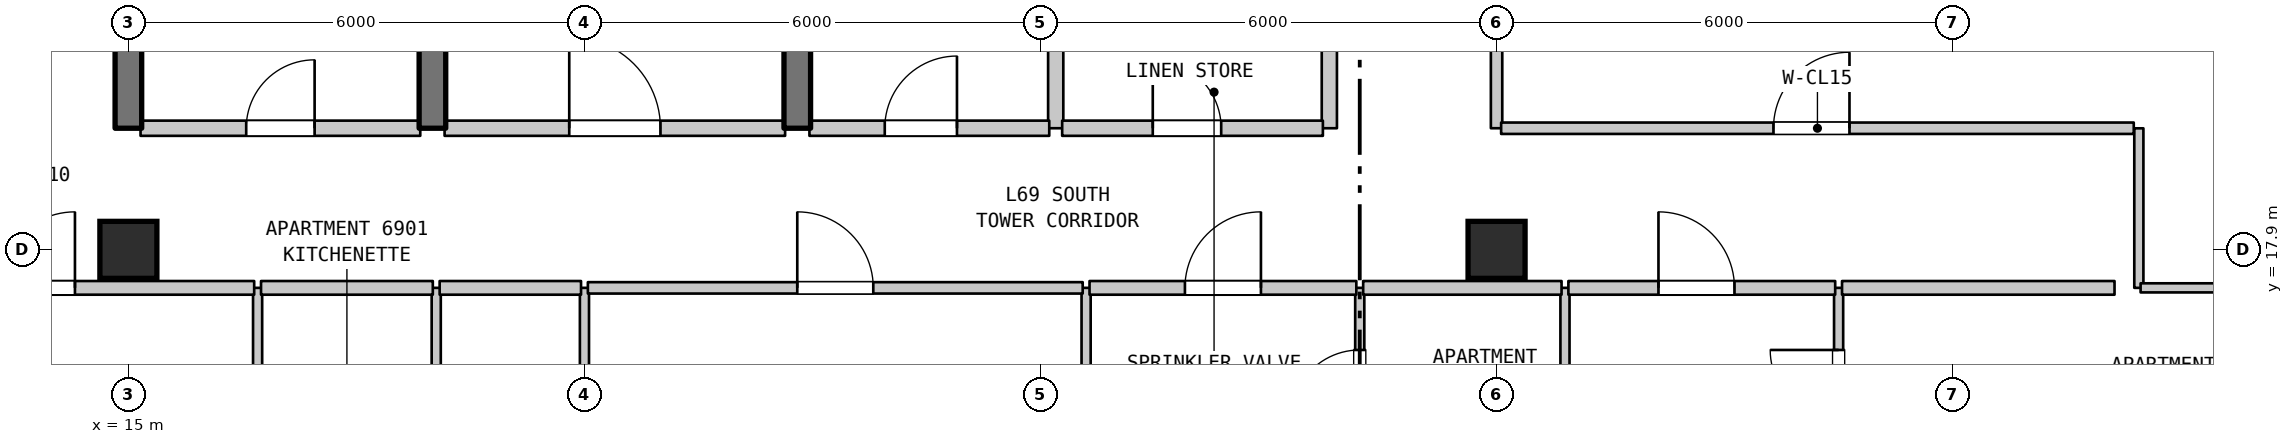
"""IFC4 building model, lengths in metres.
Left out: names, types, materials, properties, quantities, classifications, styles, units other than length and angle.
Written with IfcOpenShell. Run it as: python <this file> out.ifc"""

import sys

from ifc_helpers import new_model, si_unit, direction, frame, frame_2d, origin, origin_2d, place, context, subcontext, project, spatial, rectangle, extrude, element, fill, save


model = new_model("IFC4")
c1 = context("Model", 3, precision=1e-05, world=origin(), true_north=direction((0.0, 1.0)))
c2 = subcontext(c1, "Body", "Model", "MODEL_VIEW")
j1 = project(units=[si_unit("LENGTHUNIT", "METRE"), si_unit("PLANEANGLEUNIT", "RADIAN")], contexts=[c1])
p1 = place(None, origin())
s1 = spatial("IfcSite", under=j1, at=p1, CompositionType="ELEMENT")
p2 = place(p1, origin())
s2 = spatial("IfcBuilding", under=s1, at=p2, CompositionType="ELEMENT")
p3 = place(p2, frame((0.0, 0.0, 276.9)))
s3 = spatial("IfcBuildingStorey", under=s2, at=p3, CompositionType="ELEMENT", Elevation=276.9)
for number, where, z_axis, x_axis in (
    (1, (15.0, 17.9, 0.0), (0.0, 0.0, 1.0), (1.0, 0.0, 0.0)),
    (2, (33.0, 17.9, 0.0), (0.0, 0.0, 1.0), (1.0, 0.0, 0.0)),
):
    element("IfcColumn", number, at=place(p3, frame(where, z_axis=z_axis, x_axis=x_axis)), inside=s3, PredefinedType="COLUMN", context=c2, shape_type="SweptSolid", body=[
        extrude(rectangle(XDim=0.75, YDim=0.75, at=origin_2d()), origin(), (0.0, 0.0, 1.0), 3.7),
    ])
p4 = place(p3, frame((15.0, 19.5, 0.0), z_axis=(0.0, 0.0, 1.0), x_axis=(0.0, 1.0, 0.0)))
e3 = element("IfcWall", 3, at=p4, inside=s3, PredefinedType="SHEAR", context=c2, shape_type="SweptSolid", body=[
    extrude(rectangle(XDim=3.2, YDim=0.35, at=frame_2d((1.6, 0.0))), origin(), (0.0, 0.0, 1.0), 3.39),
])
p5 = place(p3, frame((16.7, 14.2, 0.0), z_axis=(0.0, 0.0, 1.0), x_axis=(0.0, 1.0, 0.0)))
e4 = element("IfcWall", 4, at=p5, inside=s3, PredefinedType="PARTITIONING", context=c2, shape_type="SweptSolid", body=[
    extrude(rectangle(XDim=3.2, YDim=0.12, at=frame_2d((1.6, 0.0))), origin(), (0.0, 0.0, 1.0), 3.39),
])
p6 = place(p5, frame((1.15, 0.0, 0.0)))
e5 = element("IfcOpeningElement", 5, at=p6, cuts=e4, PredefinedType="OPENING", context=c2, shape_type="SweptSolid", body=[
    extrude(rectangle(XDim=0.9, YDim=2.15, at=frame_2d((0.45, 1.075))), frame((0.0, 0.07, 0.0), z_axis=(0.0, -1.0, 0.0), x_axis=(1.0, 0.0, 0.0)), (0.0, 0.0, 1.0), 0.14),
])
p7 = place(p3, frame((19.0, 19.5, 0.0), z_axis=(0.0, 0.0, 1.0), x_axis=(0.0, 1.0, 0.0)))
e6 = element("IfcWall", 6, at=p7, inside=s3, PredefinedType="SHEAR", context=c2, shape_type="SweptSolid", body=[
    extrude(rectangle(XDim=3.2, YDim=0.35, at=frame_2d((1.6, 0.0))), origin(), (0.0, 0.0, 1.0), 3.39),
])
p8 = place(p3, frame((19.05, 14.2, 0.0), z_axis=(0.0, 0.0, 1.0), x_axis=(0.0, 1.0, 0.0)))
e7 = element("IfcWall", 7, at=p8, inside=s3, PredefinedType="PARTITIONING", context=c2, shape_type="SweptSolid", body=[
    extrude(rectangle(XDim=3.2, YDim=0.12, at=frame_2d((1.6, 0.0))), origin(), (0.0, 0.0, 1.0), 3.39),
])
p9 = place(p3, frame((21.0, 6.999, 0.0), z_axis=(0.0, 0.0, 1.0), x_axis=(0.0, 1.0, 0.0)))
e8 = element("IfcWall", 8, at=p9, inside=s3, PredefinedType="PARTITIONING", context=c2, shape_type="SweptSolid", body=[
    extrude(rectangle(XDim=10.401, YDim=0.12, at=frame_2d((5.2, 0.0))), origin(), (0.0, 0.0, 1.0), 3.39),
])
p10 = place(p3, frame((23.8, 19.5, 0.0), z_axis=(0.0, 0.0, 1.0), x_axis=(0.0, 1.0, 0.0)))
e9 = element("IfcWall", 9, at=p10, inside=s3, PredefinedType="SHEAR", context=c2, shape_type="SweptSolid", body=[
    extrude(rectangle(XDim=3.2, YDim=0.35, at=frame_2d((1.6, 0.0))), origin(), (0.0, 0.0, 1.0), 3.39),
])
p11 = place(p3, frame((27.2, 19.5, 0.0), z_axis=(0.0, 0.0, 1.0), x_axis=(0.0, 1.0, 0.0)))
e10 = element("IfcWall", 10, at=p11, inside=s3, PredefinedType="STANDARD", context=c2, shape_type="SweptSolid", body=[
    extrude(rectangle(XDim=1.6, YDim=0.2, at=frame_2d((0.8, 0.0))), origin(), (0.0, 0.0, 1.0), 3.39),
])
p12 = place(p3, frame((27.6, 6.71, 0.0), z_axis=(0.0, 0.0, 1.0), x_axis=(0.0, 1.0, 0.0)))
e11 = element("IfcWall", 11, at=p12, inside=s3, PredefinedType="PARTITIONING", context=c2, shape_type="SweptSolid", body=[
    extrude(rectangle(XDim=10.69, YDim=0.12, at=frame_2d((5.345, 0.0))), origin(), (0.0, 0.0, 1.0), 3.39),
])
p13 = place(p3, frame((30.8, 19.5, 0.0), z_axis=(0.0, 0.0, 1.0), x_axis=(0.0, 1.0, 0.0)))
e12 = element("IfcWall", 12, at=p13, inside=s3, PredefinedType="STANDARD", context=c2, shape_type="SweptSolid", body=[
    extrude(rectangle(XDim=1.6, YDim=0.2, at=frame_2d((0.8, 0.0))), origin(), (0.0, 0.0, 1.0), 3.39),
])
p14 = place(p3, frame((31.2, 15.008, 0.0), z_axis=(0.0, 0.0, 1.0), x_axis=(0.0, 1.0, 0.0)))
e13 = element("IfcWall", 13, at=p14, inside=s3, PredefinedType="PARTITIONING", context=c2, shape_type="SweptSolid", body=[
    extrude(rectangle(XDim=2.392, YDim=0.12, at=frame_2d((1.196, 0.0))), origin(), (0.0, 0.0, 1.0), 3.39),
])
p15 = place(p14, frame((0.675, 0.0, 0.0)))
e14 = element("IfcOpeningElement", 14, at=p15, cuts=e13, PredefinedType="OPENING", context=c2, shape_type="SweptSolid", body=[
    extrude(rectangle(XDim=0.9, YDim=2.1, at=frame_2d((0.45, 1.05))), frame((0.0, 0.07, 0.0), z_axis=(0.0, -1.0, 0.0), x_axis=(1.0, 0.0, 0.0)), (0.0, 0.0, 1.0), 0.14),
])
p16 = place(p3, frame((33.0, 19.5, 0.0), z_axis=(0.0, 0.0, 1.0), x_axis=(0.0, 1.0, 0.0)))
e15 = element("IfcWall", 15, at=p16, inside=s3, PredefinedType="STANDARD", context=c2, shape_type="SweptSolid", body=[
    extrude(rectangle(XDim=7.7, YDim=0.15, at=frame_2d((3.85, 0.0))), origin(), (0.0, 0.0, 1.0), 3.1),
])
p17 = place(p16, frame((3.913, 0.0, 0.0)))
e16 = element("IfcOpeningElement", 16, at=p17, cuts=e15, PredefinedType="OPENING", context=c2, shape_type="SweptSolid", body=[
    extrude(rectangle(XDim=1.0, YDim=2.15, at=frame_2d((0.5, 1.075))), frame((0.0, 0.085, 0.0), z_axis=(0.0, -1.0, 0.0), x_axis=(1.0, 0.0, 0.0)), (0.0, 0.0, 1.0), 0.17),
])
p18 = place(p3, frame((33.9, 15.008, 0.0), z_axis=(0.0, 0.0, 1.0), x_axis=(0.0, 1.0, 0.0)))
e17 = element("IfcWall", 17, at=p18, inside=s3, PredefinedType="PARTITIONING", context=c2, shape_type="SweptSolid", body=[
    extrude(rectangle(XDim=2.392, YDim=0.12, at=frame_2d((1.196, 0.0))), origin(), (0.0, 0.0, 1.0), 3.39),
])
p19 = place(p3, frame((37.5, 15.008, 0.0), z_axis=(0.0, 0.0, 1.0), x_axis=(0.0, 1.0, 0.0)))
e18 = element("IfcWall", 18, at=p19, inside=s3, PredefinedType="PARTITIONING", context=c2, shape_type="SweptSolid", body=[
    extrude(rectangle(XDim=2.392, YDim=0.12, at=frame_2d((1.196, 0.0))), origin(), (0.0, 0.0, 1.0), 3.39),
])
p20 = place(p19, frame((0.675, 0.0, 0.0)))
e19 = element("IfcOpeningElement", 19, at=p20, cuts=e18, PredefinedType="OPENING", context=c2, shape_type="SweptSolid", body=[
    extrude(rectangle(XDim=0.9, YDim=2.1, at=frame_2d((0.45, 1.05))), frame((0.0, 0.07, 0.0), z_axis=(0.0, -1.0, 0.0), x_axis=(1.0, 0.0, 0.0)), (0.0, 0.0, 1.0), 0.14),
])
p21 = place(p3, frame((41.45, 17.4, 0.0), z_axis=(0.0, 0.0, 1.0), x_axis=(0.0, 1.0, 0.0)))
e20 = element("IfcWall", 20, at=p21, inside=s3, PredefinedType="PARTITIONING", context=c2, shape_type="SweptSolid", body=[
    extrude(rectangle(XDim=2.099, YDim=0.12, at=frame_2d((1.05, 0.0))), origin(), (0.0, 0.0, 1.0), 3.39),
])
p22 = place(p3, frame((12.975, 17.4, 0.0), z_axis=(0.0, 0.0, 1.0), x_axis=(1.0, 0.0, 0.0)))
e21 = element("IfcWall", 21, at=p22, inside=s3, PredefinedType="STANDARD", context=c2, shape_type="SweptSolid", body=[
    extrude(rectangle(XDim=3.68, YDim=0.18, at=frame_2d((1.84, 0.0))), origin(), (0.0, 0.0, 1.0), 3.39),
])
p23 = place(p22, frame((0.322, 0.0, 0.0)))
e22 = element("IfcOpeningElement", 22, at=p23, cuts=e21, PredefinedType="OPENING", context=c2, shape_type="SweptSolid", body=[
    extrude(rectangle(XDim=1.0, YDim=2.15, at=frame_2d((0.5, 1.075))), frame((0.0, 0.1, 0.0), z_axis=(0.0, -1.0, 0.0), x_axis=(1.0, 0.0, 0.0)), (0.0, 0.0, 1.0), 0.2),
])
p24 = place(p3, frame((16.745, 17.4, 0.0), z_axis=(0.0, 0.0, 1.0), x_axis=(1.0, 0.0, 0.0)))
e23 = element("IfcWall", 23, at=p24, inside=s3, PredefinedType="STANDARD", context=c2, shape_type="SweptSolid", body=[
    extrude(rectangle(XDim=2.26, YDim=0.18, at=frame_2d((1.13, 0.0))), origin(), (0.0, 0.0, 1.0), 3.39),
])
p25 = place(p3, frame((19.095, 17.4, 0.0), z_axis=(0.0, 0.0, 1.0), x_axis=(1.0, 0.0, 0.0)))
e24 = element("IfcWall", 24, at=p25, inside=s3, PredefinedType="STANDARD", context=c2, shape_type="SweptSolid", body=[
    extrude(rectangle(XDim=1.86, YDim=0.18, at=frame_2d((0.93, 0.0))), origin(), (0.0, 0.0, 1.0), 3.39),
])
p26 = place(p3, frame((21.045, 17.4, 0.0), z_axis=(0.0, 0.0, 1.0), x_axis=(1.0, 0.0, 0.0)))
e25 = element("IfcWall", 25, at=p26, inside=s3, PredefinedType="STANDARD", context=c2, shape_type="SweptSolid", body=[
    extrude(rectangle(XDim=6.51, YDim=0.15, at=frame_2d((3.255, 0.0))), origin(), (0.0, 0.0, 1.0), 3.39),
])
p27 = place(p26, frame((2.755, 0.0, 0.0)))
e26 = element("IfcOpeningElement", 26, at=p27, cuts=e25, PredefinedType="OPENING", context=c2, shape_type="SweptSolid", body=[
    extrude(rectangle(XDim=1.0, YDim=2.15, at=frame_2d((0.5, 1.075))), frame((0.0, 0.085, 0.0), z_axis=(0.0, -1.0, 0.0), x_axis=(1.0, 0.0, 0.0)), (0.0, 0.0, 1.0), 0.17),
])
p28 = place(p3, frame((27.645, 17.4, 0.0), z_axis=(0.0, 0.0, 1.0), x_axis=(1.0, 0.0, 0.0)))
e27 = element("IfcWall", 27, at=p28, inside=s3, PredefinedType="STANDARD", context=c2, shape_type="SweptSolid", body=[
    extrude(rectangle(XDim=3.51, YDim=0.18, at=frame_2d((1.755, 0.0))), origin(), (0.0, 0.0, 1.0), 3.39),
])
p29 = place(p28, frame((1.255, 0.0, 0.0)))
e28 = element("IfcOpeningElement", 28, at=p29, cuts=e27, PredefinedType="OPENING", context=c2, shape_type="SweptSolid", body=[
    extrude(rectangle(XDim=1.0, YDim=2.15, at=frame_2d((0.5, 1.075))), frame((0.0, 0.1, 0.0), z_axis=(0.0, -1.0, 0.0), x_axis=(1.0, 0.0, 0.0)), (0.0, 0.0, 1.0), 0.2),
])
p30 = place(p3, frame((31.245, 17.4, 0.0), z_axis=(0.0, 0.0, 1.0), x_axis=(1.0, 0.0, 0.0)))
e29 = element("IfcWall", 29, at=p30, inside=s3, PredefinedType="STANDARD", context=c2, shape_type="SweptSolid", body=[
    extrude(rectangle(XDim=2.61, YDim=0.18, at=frame_2d((1.305, 0.0))), origin(), (0.0, 0.0, 1.0), 3.39),
])
p31 = place(p3, frame((33.945, 17.4, 0.0), z_axis=(0.0, 0.0, 1.0), x_axis=(1.0, 0.0, 0.0)))
e30 = element("IfcWall", 30, at=p31, inside=s3, PredefinedType="STANDARD", context=c2, shape_type="SweptSolid", body=[
    extrude(rectangle(XDim=3.51, YDim=0.18, at=frame_2d((1.755, 0.0))), origin(), (0.0, 0.0, 1.0), 3.39),
])
p32 = place(p31, frame((1.185, 0.0, 0.0)))
e31 = element("IfcOpeningElement", 31, at=p32, cuts=e30, PredefinedType="OPENING", context=c2, shape_type="SweptSolid", body=[
    extrude(rectangle(XDim=1.0, YDim=2.15, at=frame_2d((0.5, 1.075))), frame((0.0, 0.1, 0.0), z_axis=(0.0, -1.0, 0.0), x_axis=(1.0, 0.0, 0.0)), (0.0, 0.0, 1.0), 0.2),
])
p33 = place(p3, frame((37.545, 17.4, 0.0), z_axis=(0.0, 0.0, 1.0), x_axis=(1.0, 0.0, 0.0)))
e32 = element("IfcWall", 32, at=p33, inside=s3, PredefinedType="STANDARD", context=c2, shape_type="SweptSolid", body=[
    extrude(rectangle(XDim=3.585, YDim=0.18, at=frame_2d((1.792, 0.0))), origin(), (0.0, 0.0, 1.0), 3.39),
])
p34 = place(p3, frame((41.473, 17.4, 0.0), z_axis=(0.0, 0.0, 1.0), x_axis=(1.0, 0.0, 0.0)))
e33 = element("IfcWall", 33, at=p34, inside=s3, PredefinedType="PARTITIONING", context=c2, shape_type="SweptSolid", body=[
    extrude(rectangle(XDim=2.031, YDim=0.12, at=frame_2d((1.016, 0.0))), origin(), (0.0, 0.0, 1.0), 3.39),
])
p35 = place(p3, frame((15.16, 19.5, 0.0), z_axis=(0.0, 0.0, 1.0), x_axis=(1.0, 0.0, 0.0)))
e34 = element("IfcWall", 34, at=p35, inside=s3, PredefinedType="STANDARD", context=c2, shape_type="SweptSolid", body=[
    extrude(rectangle(XDim=3.68, YDim=0.2, at=frame_2d((1.84, 0.0))), origin(), (0.0, 0.0, 1.0), 3.39),
])
p36 = place(p35, frame((1.39, 0.0, 0.0)))
e35 = element("IfcOpeningElement", 35, at=p36, cuts=e34, PredefinedType="OPENING", context=c2, shape_type="SweptSolid", body=[
    extrude(rectangle(XDim=0.9, YDim=2.15, at=frame_2d((0.45, 1.075))), frame((0.0, 0.11, 0.0), z_axis=(0.0, -1.0, 0.0), x_axis=(1.0, 0.0, 0.0)), (0.0, 0.0, 1.0), 0.22),
])
p37 = place(p3, frame((19.16, 19.5, 0.0), z_axis=(0.0, 0.0, 1.0), x_axis=(1.0, 0.0, 0.0)))
e36 = element("IfcWall", 36, at=p37, inside=s3, PredefinedType="STANDARD", context=c2, shape_type="SweptSolid", body=[
    extrude(rectangle(XDim=4.48, YDim=0.2, at=frame_2d((2.24, 0.0))), origin(), (0.0, 0.0, 1.0), 3.39),
])
p38 = place(p37, frame((1.64, 0.0, 0.0)))
e37 = element("IfcOpeningElement", 37, at=p38, cuts=e36, PredefinedType="OPENING", context=c2, shape_type="SweptSolid", body=[
    extrude(rectangle(XDim=1.2, YDim=2.2, at=frame_2d((0.6, 1.1))), frame((0.0, 0.11, 0.0), z_axis=(0.0, -1.0, 0.0), x_axis=(1.0, 0.0, 0.0)), (0.0, 0.0, 1.0), 0.22),
])
p39 = place(p3, frame((23.96, 19.5, 0.0), z_axis=(0.0, 0.0, 1.0), x_axis=(1.0, 0.0, 0.0)))
e38 = element("IfcWall", 38, at=p39, inside=s3, PredefinedType="STANDARD", context=c2, shape_type="SweptSolid", body=[
    extrude(rectangle(XDim=3.155, YDim=0.2, at=frame_2d((1.578, 0.0))), origin(), (0.0, 0.0, 1.0), 3.39),
])
p40 = place(p39, frame((0.991, 0.0, 0.0)))
e39 = element("IfcOpeningElement", 39, at=p40, cuts=e38, PredefinedType="OPENING", context=c2, shape_type="SweptSolid", body=[
    extrude(rectangle(XDim=0.95, YDim=2.15, at=frame_2d((0.475, 1.075))), frame((0.0, 0.11, 0.0), z_axis=(0.0, -1.0, 0.0), x_axis=(1.0, 0.0, 0.0)), (0.0, 0.0, 1.0), 0.22),
])
p41 = place(p3, frame((27.285, 19.5, 0.0), z_axis=(0.0, 0.0, 1.0), x_axis=(1.0, 0.0, 0.0)))
e40 = element("IfcWall", 40, at=p41, inside=s3, PredefinedType="STANDARD", context=c2, shape_type="SweptSolid", body=[
    extrude(rectangle(XDim=3.43, YDim=0.2, at=frame_2d((1.715, 0.0))), origin(), (0.0, 0.0, 1.0), 3.39),
])
p42 = place(p41, frame((1.192, 0.0, 0.0)))
e41 = element("IfcOpeningElement", 41, at=p42, cuts=e40, PredefinedType="OPENING", context=c2, shape_type="SweptSolid", body=[
    extrude(rectangle(XDim=0.9, YDim=2.15, at=frame_2d((0.45, 1.075))), frame((0.0, 0.11, 0.0), z_axis=(0.0, -1.0, 0.0), x_axis=(1.0, 0.0, 0.0)), (0.0, 0.0, 1.0), 0.22),
])
p43 = place(p3, frame((33.06, 19.5, 0.0), z_axis=(0.0, 0.0, 1.0), x_axis=(1.0, 0.0, 0.0)))
e42 = element("IfcWall", 42, at=p43, inside=s3, PredefinedType="STANDARD", context=c2, shape_type="SweptSolid", body=[
    extrude(rectangle(XDim=8.323, YDim=0.15, at=frame_2d((4.162, 0.0))), origin(), (0.0, 0.0, 1.0), 3.39),
])
p44 = place(p43, frame((3.583, 0.0, 0.0)))
e43 = element("IfcOpeningElement", 43, at=p44, cuts=e42, PredefinedType="OPENING", context=c2, shape_type="SweptSolid", body=[
    extrude(rectangle(XDim=1.0, YDim=2.15, at=frame_2d((0.5, 1.075))), frame((0.0, 0.085, 0.0), z_axis=(0.0, -1.0, 0.0), x_axis=(1.0, 0.0, 0.0)), (0.0, 0.0, 1.0), 0.17),
])
p45 = place(p15, origin())
e44 = element("IfcDoor", 44, at=p45, inside=s3, OperationType="SINGLE_SWING_LEFT", PredefinedType="DOOR", context=c2, shape_type="SweptSolid", body=[
    extrude(rectangle(XDim=0.9, YDim=2.1, at=frame_2d((0.45, 1.05))), frame((0.0, 0.025, 0.0), z_axis=(0.0, -1.0, 0.0), x_axis=(1.0, 0.0, 0.0)), (0.0, 0.0, 1.0), 0.05),
])
fill(e14, e44)
p46 = place(p20, origin())
e45 = element("IfcDoor", 45, at=p46, inside=s3, OperationType="SINGLE_SWING_RIGHT", PredefinedType="DOOR", context=c2, shape_type="SweptSolid", body=[
    extrude(rectangle(XDim=0.9, YDim=2.1, at=frame_2d((0.45, 1.05))), frame((0.0, 0.025, 0.0), z_axis=(0.0, -1.0, 0.0), x_axis=(1.0, 0.0, 0.0)), (0.0, 0.0, 1.0), 0.05),
])
fill(e19, e45)
p47 = place(p23, origin())
e46 = element("IfcDoor", 46, at=p47, inside=s3, OperationType="SINGLE_SWING_RIGHT", PredefinedType="DOOR", context=c2, shape_type="SweptSolid", body=[
    extrude(rectangle(XDim=1.0, YDim=2.15, at=frame_2d((0.5, 1.075))), frame((0.0, 0.025, 0.0), z_axis=(0.0, -1.0, 0.0), x_axis=(1.0, 0.0, 0.0)), (0.0, 0.0, 1.0), 0.05),
])
fill(e22, e46)
p48 = place(p27, origin())
e47 = element("IfcDoor", 47, at=p48, inside=s3, OperationType="SINGLE_SWING_LEFT", PredefinedType="DOOR", context=c2, shape_type="SweptSolid", body=[
    extrude(rectangle(XDim=1.0, YDim=2.15, at=frame_2d((0.5, 1.075))), frame((0.0, 0.025, 0.0), z_axis=(0.0, -1.0, 0.0), x_axis=(1.0, 0.0, 0.0)), (0.0, 0.0, 1.0), 0.05),
])
fill(e26, e47)
p49 = place(p29, origin())
e48 = element("IfcDoor", 48, at=p49, inside=s3, OperationType="SINGLE_SWING_RIGHT", PredefinedType="DOOR", context=c2, shape_type="SweptSolid", body=[
    extrude(rectangle(XDim=1.0, YDim=2.15, at=frame_2d((0.5, 1.075))), frame((0.0, 0.025, 0.0), z_axis=(0.0, -1.0, 0.0), x_axis=(1.0, 0.0, 0.0)), (0.0, 0.0, 1.0), 0.05),
])
fill(e28, e48)
p50 = place(p32, origin())
e49 = element("IfcDoor", 49, at=p50, inside=s3, OperationType="SINGLE_SWING_LEFT", PredefinedType="DOOR", context=c2, shape_type="SweptSolid", body=[
    extrude(rectangle(XDim=1.0, YDim=2.15, at=frame_2d((0.5, 1.075))), frame((0.0, 0.025, 0.0), z_axis=(0.0, -1.0, 0.0), x_axis=(1.0, 0.0, 0.0)), (0.0, 0.0, 1.0), 0.05),
])
fill(e31, e49)
p51 = place(p36, origin())
e50 = element("IfcDoor", 50, at=p51, inside=s3, OperationType="SINGLE_SWING_RIGHT", PredefinedType="DOOR", context=c2, shape_type="SweptSolid", body=[
    extrude(rectangle(XDim=0.9, YDim=2.15, at=frame_2d((0.45, 1.075))), frame((0.0, 0.025, 0.0), z_axis=(0.0, -1.0, 0.0), x_axis=(1.0, 0.0, 0.0)), (0.0, 0.0, 1.0), 0.05),
])
fill(e35, e50)
p52 = place(p38, origin())
e51 = element("IfcDoor", 51, at=p52, inside=s3, OperationType="SINGLE_SWING_LEFT", PredefinedType="DOOR", context=c2, shape_type="SweptSolid", body=[
    extrude(rectangle(XDim=1.2, YDim=2.2, at=frame_2d((0.6, 1.1))), frame((0.0, 0.025, 0.0), z_axis=(0.0, -1.0, 0.0), x_axis=(1.0, 0.0, 0.0)), (0.0, 0.0, 1.0), 0.05),
])
fill(e37, e51)
p53 = place(p40, origin())
e52 = element("IfcDoor", 52, at=p53, inside=s3, OperationType="SINGLE_SWING_RIGHT", PredefinedType="DOOR", context=c2, shape_type="SweptSolid", body=[
    extrude(rectangle(XDim=0.95, YDim=2.15, at=frame_2d((0.475, 1.075))), frame((0.0, 0.025, 0.0), z_axis=(0.0, -1.0, 0.0), x_axis=(1.0, 0.0, 0.0)), (0.0, 0.0, 1.0), 0.05),
])
fill(e39, e52)
p54 = place(p42, origin())
e53 = element("IfcDoor", 53, at=p54, inside=s3, OperationType="SINGLE_SWING_LEFT", PredefinedType="DOOR", context=c2, shape_type="SweptSolid", body=[
    extrude(rectangle(XDim=0.9, YDim=2.15, at=frame_2d((0.45, 1.075))), frame((0.0, 0.025, 0.0), z_axis=(0.0, -1.0, 0.0), x_axis=(1.0, 0.0, 0.0)), (0.0, 0.0, 1.0), 0.05),
])
fill(e41, e53)
p55 = place(p44, origin())
e54 = element("IfcDoor", 54, at=p55, inside=s3, OperationType="SINGLE_SWING_RIGHT", PredefinedType="DOOR", context=c2, shape_type="SweptSolid", body=[
    extrude(rectangle(XDim=1.0, YDim=2.15, at=frame_2d((0.5, 1.075))), frame((0.0, 0.025, 0.0), z_axis=(0.0, -1.0, 0.0), x_axis=(1.0, 0.0, 0.0)), (0.0, 0.0, 1.0), 0.05),
])
fill(e43, e54)
save(model, sys.argv[1])
